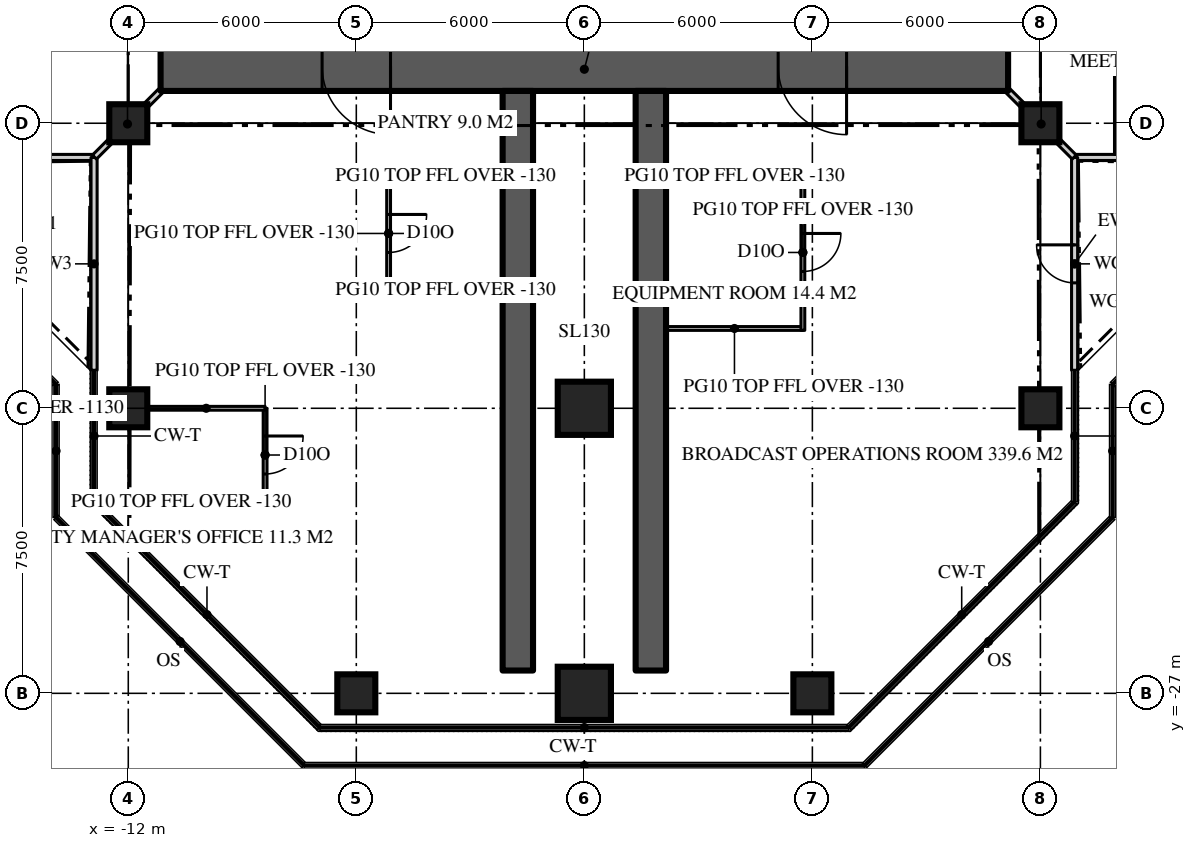
"""IFC4 building model, lengths in metres.
Left out: names, types, materials, properties, quantities, classifications, styles, units other than length and angle.
Written with IfcOpenShell. Run it as: python <this file> out.ifc"""

import sys

from ifc_helpers import new_model, si_unit, direction, frame, frame_2d, origin, origin_2d, place, context, subcontext, project, spatial, rectangle, extrude, element, fill, save


model = new_model("IFC4")
c1 = context("Model", 3, precision=1e-05, world=origin(), true_north=direction((0.0, 1.0)))
c2 = subcontext(c1, "Body", "Model", "MODEL_VIEW")
j1 = project(units=[si_unit("LENGTHUNIT", "METRE"), si_unit("PLANEANGLEUNIT", "RADIAN")], contexts=[c1])
p1 = place(None, origin())
s1 = spatial("IfcSite", under=j1, at=p1, CompositionType="ELEMENT")
p2 = place(p1, origin())
s2 = spatial("IfcBuilding", under=s1, at=p2, CompositionType="ELEMENT")
p3 = place(p2, frame((0.0, 0.0, 275.1)))
s3 = spatial("IfcBuildingStorey", under=s2, at=p3, CompositionType="ELEMENT", Elevation=275.1)
p4 = place(p3, frame((11.15, -10.5, 0.0), z_axis=(0.0, 0.0, 1.0), x_axis=(-1.0, 0.0, 0.0)))
e1 = element("IfcWall", 1, at=p4, inside=s3, PredefinedType="SHEAR", context=c2, shape_type="SweptSolid", body=[
    extrude(rectangle(XDim=22.3, YDim=1.3, at=frame_2d((11.15, 0.0))), origin(), (0.0, 0.0, 1.0), 3.9),
])
p5 = place(p4, frame((16.25, 0.0, 0.0)))
e2 = element("IfcOpeningElement", 2, at=p5, cuts=e1, PredefinedType="OPENING", context=c2, shape_type="SweptSolid", body=[
    extrude(rectangle(XDim=1.8, YDim=2.2, at=frame_2d((0.9, 1.1))), frame((0.0, 0.66, 0.0), z_axis=(0.0, -1.0, 0.0), x_axis=(1.0, 0.0, 0.0)), (0.0, 0.0, 1.0), 1.32),
])
p6 = place(p4, frame((4.25, 0.0, 0.0)))
e3 = element("IfcOpeningElement", 3, at=p6, cuts=e1, PredefinedType="OPENING", context=c2, shape_type="SweptSolid", body=[
    extrude(rectangle(XDim=1.8, YDim=2.2, at=frame_2d((0.9, 1.1))), frame((0.0, 0.66, 0.0), z_axis=(0.0, -1.0, 0.0), x_axis=(1.0, 0.0, 0.0)), (0.0, 0.0, 1.0), 1.32),
])
for number, where, z_axis, x_axis in (
    (4, (-1.75, -11.15, 0.0), (0.0, 0.0, 1.0), (0.0, -1.0, 0.0)),
    (5, (1.75, -11.15, 0.0), (0.0, 0.0, 1.0), (0.0, -1.0, 0.0)),
):
    element("IfcWall", number, at=place(p3, frame(where, z_axis=z_axis, x_axis=x_axis)), inside=s3, PredefinedType="SHEAR", context=c2, shape_type="SweptSolid", body=[
        extrude(rectangle(XDim=15.25, YDim=0.8, at=frame_2d((7.625, 0.0))), origin(), (0.0, 0.0, 1.0), 3.9),
    ])
p7 = place(p3, frame((-6.0, -27.0, 0.0), z_axis=(0.0, 0.0, 1.0), x_axis=(1.0, 0.0, 0.0)))
e6 = element("IfcColumn", 6, at=p7, inside=s3, PredefinedType="COLUMN", context=c2, shape_type="SweptSolid", body=[
    extrude(rectangle(XDim=1.0, YDim=1.0, at=origin_2d()), origin(), (0.0, 0.0, 1.0), 3.9),
])
p8 = place(p3, frame((0.0, -27.0, 0.0), z_axis=(0.0, 0.0, 1.0), x_axis=(1.0, 0.0, 0.0)))
e7 = element("IfcColumn", 7, at=p8, inside=s3, PredefinedType="COLUMN", context=c2, shape_type="SweptSolid", body=[
    extrude(rectangle(XDim=1.4, YDim=1.4, at=origin_2d()), origin(), (0.0, 0.0, 1.0), 3.9),
])
for number, where, z_axis, x_axis in (
    (8, (6.0, -27.0, 0.0), (0.0, 0.0, 1.0), (1.0, 0.0, 0.0)),
    (9, (-12.0, -19.5, 0.0), (0.0, 0.0, 1.0), (1.0, 0.0, 0.0)),
):
    element("IfcColumn", number, at=place(p3, frame(where, z_axis=z_axis, x_axis=x_axis)), inside=s3, PredefinedType="COLUMN", context=c2, shape_type="SweptSolid", body=[
        extrude(rectangle(XDim=1.0, YDim=1.0, at=origin_2d()), origin(), (0.0, 0.0, 1.0), 3.9),
    ])
p9 = place(p3, frame((0.0, -19.5, 0.0), z_axis=(0.0, 0.0, 1.0), x_axis=(1.0, 0.0, 0.0)))
e10 = element("IfcColumn", 10, at=p9, inside=s3, PredefinedType="COLUMN", context=c2, shape_type="SweptSolid", body=[
    extrude(rectangle(XDim=1.4, YDim=1.4, at=origin_2d()), origin(), (0.0, 0.0, 1.0), 3.9),
])
for number, where, z_axis, x_axis in (
    (11, (12.0, -19.5, 0.0), (0.0, 0.0, 1.0), (1.0, 0.0, 0.0)),
    (12, (-12.0, -12.0, 0.0), (0.0, 0.0, 1.0), (1.0, 0.0, 0.0)),
    (13, (12.0, -12.0, 0.0), (0.0, 0.0, 1.0), (1.0, 0.0, 0.0)),
):
    element("IfcColumn", number, at=place(p3, frame(where, z_axis=z_axis, x_axis=x_axis)), inside=s3, PredefinedType="COLUMN", context=c2, shape_type="SweptSolid", body=[
        extrude(rectangle(XDim=1.0, YDim=1.0, at=origin_2d()), origin(), (0.0, 0.0, 1.0), 3.9),
    ])
p10 = place(p3, frame((12.9, -12.9, 0.0), z_axis=(0.0, 0.0, 1.0), x_axis=(1.0, 0.0, 0.0)))
e14 = element("IfcWall", 14, at=p10, inside=s3, PredefinedType="SOLIDWALL", context=c2, shape_type="SweptSolid", body=[
    extrude(rectangle(XDim=5.6, YDim=0.16, at=frame_2d((2.8, 0.0))), origin(), (0.0, 0.0, 1.0), 3.77),
])
p11 = place(p3, frame((-18.5, -12.9, 0.0), z_axis=(0.0, 0.0, 1.0), x_axis=(1.0, 0.0, 0.0)))
e15 = element("IfcWall", 15, at=p11, inside=s3, PredefinedType="SOLIDWALL", context=c2, shape_type="SweptSolid", body=[
    extrude(rectangle(XDim=5.6, YDim=0.16, at=frame_2d((2.8, 0.0))), origin(), (0.0, 0.0, 1.0), 3.77),
])
p12 = place(p11, frame((2.3, 0.0, 0.0)))
e16 = element("IfcOpeningElement", 16, at=p12, cuts=e15, PredefinedType="OPENING", context=c2, shape_type="SweptSolid", body=[
    extrude(rectangle(XDim=1.0, YDim=2.2, at=frame_2d((0.5, 1.1))), frame((0.0, 0.09, 0.0), z_axis=(0.0, -1.0, 0.0), x_axis=(1.0, 0.0, 0.0)), (0.0, 0.0, 1.0), 0.18),
])
p13 = place(p3, frame((-12.9, -12.9, 0.0), z_axis=(0.0, 0.0, 1.0), x_axis=(0.0, -1.0, 0.0)))
e17 = element("IfcWall", 17, at=p13, inside=s3, PredefinedType="SOLIDWALL", context=c2, shape_type="SweptSolid", body=[
    extrude(rectangle(XDim=5.6, YDim=0.16, at=frame_2d((2.8, 0.0))), origin(), (0.0, 0.0, 1.0), 3.77),
])
p14 = place(p3, frame((12.9, -18.5, 0.0), z_axis=(0.0, 0.0, 1.0), x_axis=(0.0, 1.0, 0.0)))
e18 = element("IfcWall", 18, at=p14, inside=s3, PredefinedType="SOLIDWALL", context=c2, shape_type="SweptSolid", body=[
    extrude(rectangle(XDim=5.6, YDim=0.16, at=frame_2d((2.8, 0.0))), origin(), (0.0, 0.0, 1.0), 3.77),
])
p15 = place(p14, frame((2.3, 0.0, 0.0)))
e19 = element("IfcOpeningElement", 19, at=p15, cuts=e18, PredefinedType="OPENING", context=c2, shape_type="SweptSolid", body=[
    extrude(rectangle(XDim=1.0, YDim=2.2, at=frame_2d((0.5, 1.1))), frame((0.0, 0.09, 0.0), z_axis=(0.0, -1.0, 0.0), x_axis=(1.0, 0.0, 0.0)), (0.0, 0.0, 1.0), 0.18),
])
p16 = place(p3, frame((14.0, -4.0, 0.0), z_axis=(0.0, 0.0, 1.0), x_axis=(0.0, -1.0, 0.0)))
e20 = element("IfcWall", 20, at=p16, inside=s3, PredefinedType="PARTITIONING", context=c2, shape_type="SweptSolid", body=[
    extrude(rectangle(XDim=8.82, YDim=0.1, at=frame_2d((4.41, 0.0))), origin(), (0.0, 0.0, 1.0), 3.18),
])
p17 = place(p3, frame((-8.4, -19.5, 0.0), z_axis=(0.0, 0.0, 1.0), x_axis=(0.0, -1.0, 0.0)))
e21 = element("IfcWall", 21, at=p17, inside=s3, PredefinedType="PARTITIONING", context=c2, shape_type="SweptSolid", body=[
    extrude(rectangle(XDim=2.459, YDim=0.1, at=frame_2d((1.229, 0.0))), origin(), (0.0, 0.0, 1.0), 3.77),
])
p18 = place(p17, frame((0.729, 0.0, 0.0)))
e22 = element("IfcOpeningElement", 22, at=p18, cuts=e21, PredefinedType="OPENING", context=c2, shape_type="SweptSolid", body=[
    extrude(rectangle(XDim=1.0, YDim=2.2, at=frame_2d((0.5, 1.1))), frame((0.0, 0.06, 0.0), z_axis=(0.0, -1.0, 0.0), x_axis=(1.0, 0.0, 0.0)), (0.0, 0.0, 1.0), 0.12),
])
p19 = place(p3, frame((-8.4, -19.5, 0.0), z_axis=(0.0, 0.0, 1.0), x_axis=(-1.0, 0.0, 0.0)))
e23 = element("IfcWall", 23, at=p19, inside=s3, PredefinedType="PARTITIONING", context=c2, shape_type="SweptSolid", body=[
    extrude(rectangle(XDim=3.1, YDim=0.1, at=frame_2d((1.55, 0.0))), origin(), (0.0, 0.0, 1.0), 2.77),
])
p20 = place(p3, frame((-8.4, -21.959, 0.0), z_axis=(0.0, 0.0, 1.0), x_axis=(-1.0, 0.0, 0.0)))
e24 = element("IfcWall", 24, at=p20, inside=s3, PredefinedType="PARTITIONING", context=c2, shape_type="SweptSolid", body=[
    extrude(rectangle(XDim=4.42, YDim=0.1, at=frame_2d((2.21, 0.0))), origin(), (0.0, 0.0, 1.0), 3.77),
])
for number, where, z_axis, x_axis in (
    (25, (2.15, -13.4, 0.0), (0.0, 0.0, 1.0), (1.0, 0.0, 0.0)),
    (26, (2.15, -17.4, 0.0), (0.0, 0.0, 1.0), (1.0, 0.0, 0.0)),
):
    element("IfcWall", number, at=place(p3, frame(where, z_axis=z_axis, x_axis=x_axis)), inside=s3, PredefinedType="PARTITIONING", context=c2, shape_type="SweptSolid", body=[
        extrude(rectangle(XDim=3.6, YDim=0.1, at=frame_2d((1.8, 0.0))), origin(), (0.0, 0.0, 1.0), 3.77),
    ])
p21 = place(p3, frame((5.75, -13.35, 0.0), z_axis=(0.0, 0.0, 1.0), x_axis=(0.0, -1.0, 0.0)))
e27 = element("IfcWall", 27, at=p21, inside=s3, PredefinedType="PARTITIONING", context=c2, shape_type="SweptSolid", body=[
    extrude(rectangle(XDim=4.1, YDim=0.1, at=frame_2d((2.05, 0.0))), origin(), (0.0, 0.0, 1.0), 3.77),
])
p22 = place(p21, frame((1.55, 0.0, 0.0)))
e28 = element("IfcOpeningElement", 28, at=p22, cuts=e27, PredefinedType="OPENING", context=c2, shape_type="SweptSolid", body=[
    extrude(rectangle(XDim=1.0, YDim=2.2, at=frame_2d((0.5, 1.1))), frame((0.0, 0.06, 0.0), z_axis=(0.0, -1.0, 0.0), x_axis=(1.0, 0.0, 0.0)), (0.0, 0.0, 1.0), 0.12),
])
for number, where, z_axis, x_axis in (
    (29, (-2.15, -13.4, 0.0), (0.0, 0.0, 1.0), (-1.0, 0.0, 0.0)),
    (30, (-2.15, -16.4, 0.0), (0.0, 0.0, 1.0), (-1.0, 0.0, 0.0)),
):
    element("IfcWall", number, at=place(p3, frame(where, z_axis=z_axis, x_axis=x_axis)), inside=s3, PredefinedType="PARTITIONING", context=c2, shape_type="SweptSolid", body=[
        extrude(rectangle(XDim=3.0, YDim=0.1, at=frame_2d((1.5, 0.0))), origin(), (0.0, 0.0, 1.0), 3.77),
    ])
p23 = place(p3, frame((-5.15, -13.35, 0.0), z_axis=(0.0, 0.0, 1.0), x_axis=(0.0, -1.0, 0.0)))
e31 = element("IfcWall", 31, at=p23, inside=s3, PredefinedType="PARTITIONING", context=c2, shape_type="SweptSolid", body=[
    extrude(rectangle(XDim=3.1, YDim=0.1, at=frame_2d((1.55, 0.0))), origin(), (0.0, 0.0, 1.0), 3.77),
])
p24 = place(p23, frame((1.05, 0.0, 0.0)))
e32 = element("IfcOpeningElement", 32, at=p24, cuts=e31, PredefinedType="OPENING", context=c2, shape_type="SweptSolid", body=[
    extrude(rectangle(XDim=1.0, YDim=2.2, at=frame_2d((0.5, 1.1))), frame((0.0, 0.06, 0.0), z_axis=(0.0, -1.0, 0.0), x_axis=(1.0, 0.0, 0.0)), (0.0, 0.0, 1.0), 0.12),
])
for number, where, z_axis, x_axis in (
    (33, (-11.15, -11.15, 0.0), (0.0, 0.0, 1.0), (-0.707, -0.707, 0.0)),
    (34, (11.15, -11.15, 0.0), (0.0, 0.0, 1.0), (0.707, -0.707, 0.0)),
):
    element("IfcWall", number, at=place(p3, frame(where, z_axis=z_axis, x_axis=x_axis)), inside=s3, PredefinedType="PARTITIONING", context=c2, shape_type="SweptSolid", body=[
        extrude(rectangle(XDim=2.461, YDim=0.15, at=frame_2d((1.23, 0.0))), origin(), (0.0, 0.0, 1.0), 3.22),
    ])
p25 = place(p15, origin())
e35 = element("IfcDoor", 35, at=p25, inside=s3, OperationType="SINGLE_SWING_RIGHT", PredefinedType="DOOR", context=c2, shape_type="SweptSolid", body=[
    extrude(rectangle(XDim=1.0, YDim=2.2, at=frame_2d((0.5, 1.1))), frame((0.0, 0.025, 0.0), z_axis=(0.0, -1.0, 0.0), x_axis=(1.0, 0.0, 0.0)), (0.0, 0.0, 1.0), 0.05),
])
fill(e19, e35)
p26 = place(p5, origin())
e36 = element("IfcDoor", 36, at=p26, inside=s3, OperationType="DOUBLE_DOOR_DOUBLE_SWING", PredefinedType="DOOR", context=c2, shape_type="SweptSolid", body=[
    extrude(rectangle(XDim=1.8, YDim=2.2, at=frame_2d((0.9, 1.1))), frame((0.0, 0.025, 0.0), z_axis=(0.0, -1.0, 0.0), x_axis=(1.0, 0.0, 0.0)), (0.0, 0.0, 1.0), 0.05),
])
fill(e2, e36)
p27 = place(p6, origin())
e37 = element("IfcDoor", 37, at=p27, inside=s3, OperationType="DOUBLE_DOOR_DOUBLE_SWING", PredefinedType="DOOR", context=c2, shape_type="SweptSolid", body=[
    extrude(rectangle(XDim=1.8, YDim=2.2, at=frame_2d((0.9, 1.1))), frame((0.0, 0.025, 0.0), z_axis=(0.0, -1.0, 0.0), x_axis=(1.0, 0.0, 0.0)), (0.0, 0.0, 1.0), 0.05),
])
fill(e3, e37)
p28 = place(p18, origin())
e38 = element("IfcDoor", 38, at=p28, inside=s3, OperationType="SINGLE_SWING_LEFT", PredefinedType="DOOR", context=c2, shape_type="SweptSolid", body=[
    extrude(rectangle(XDim=1.0, YDim=2.2, at=frame_2d((0.5, 1.1))), frame((0.0, 0.025, 0.0), z_axis=(0.0, -1.0, 0.0), x_axis=(1.0, 0.0, 0.0)), (0.0, 0.0, 1.0), 0.05),
])
fill(e22, e38)
p29 = place(p22, origin())
e39 = element("IfcDoor", 39, at=p29, inside=s3, OperationType="SINGLE_SWING_LEFT", PredefinedType="DOOR", context=c2, shape_type="SweptSolid", body=[
    extrude(rectangle(XDim=1.0, YDim=2.2, at=frame_2d((0.5, 1.1))), frame((0.0, 0.025, 0.0), z_axis=(0.0, -1.0, 0.0), x_axis=(1.0, 0.0, 0.0)), (0.0, 0.0, 1.0), 0.05),
])
fill(e28, e39)
p30 = place(p24, origin())
e40 = element("IfcDoor", 40, at=p30, inside=s3, OperationType="SINGLE_SWING_LEFT", PredefinedType="DOOR", context=c2, shape_type="SweptSolid", body=[
    extrude(rectangle(XDim=1.0, YDim=2.2, at=frame_2d((0.5, 1.1))), frame((0.0, 0.025, 0.0), z_axis=(0.0, -1.0, 0.0), x_axis=(1.0, 0.0, 0.0)), (0.0, 0.0, 1.0), 0.05),
])
fill(e32, e40)
save(model, sys.argv[1])
